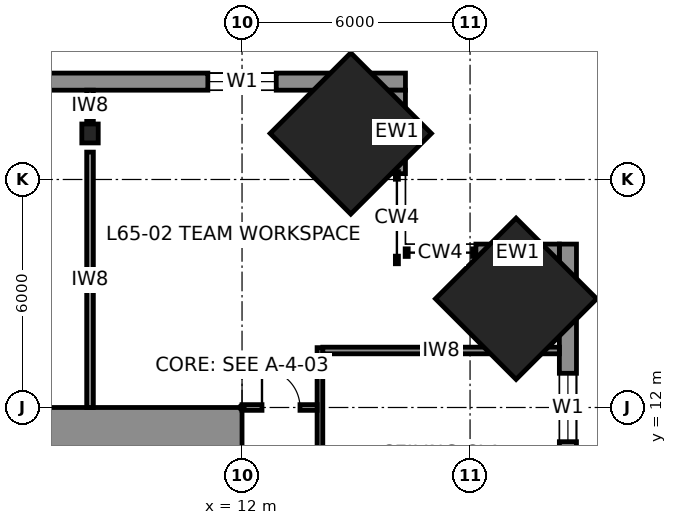
"""IFC4 building model, lengths in metres.
Left out: names, types, materials, properties, quantities, classifications, styles, units other than length and angle.
Written with IfcOpenShell. Run it as: python <this file> out.ifc"""

import sys

from ifc_helpers import new_model, si_unit, direction, frame, frame_2d, origin, origin_2d, place, context, subcontext, project, spatial, rectangle, i_section, extrude, element, fill, save


model = new_model("IFC4")
c1 = context("Model", 3, precision=1e-05, world=origin(), true_north=direction((0.0, 1.0)))
c2 = subcontext(c1, "Body", "Model", "MODEL_VIEW")
j1 = project(units=[si_unit("LENGTHUNIT", "METRE"), si_unit("PLANEANGLEUNIT", "RADIAN")], contexts=[c1])
p1 = place(None, origin())
s1 = spatial("IfcSite", under=j1, at=p1, CompositionType="ELEMENT")
p2 = place(p1, origin())
s2 = spatial("IfcBuilding", under=s1, at=p2, CompositionType="ELEMENT")
p3 = place(p2, frame((0.0, 0.0, 289.8)))
s3 = spatial("IfcBuildingStorey", under=s2, at=p3, CompositionType="ELEMENT", Elevation=289.8)
for number, where, z_axis, x_axis in (
    (1, (14.861, 19.211, 0.0), (-0.04, -0.04, 0.998), (0.707, -0.708, 0.0)),
    (2, (19.211, 14.861, 0.0), (-0.04, -0.04, 0.998), (0.708, -0.707, 0.0)),
):
    element("IfcColumn", number, at=place(p3, frame(where, z_axis=z_axis, x_axis=x_axis)), inside=s3, PredefinedType="COLUMN", context=c2, shape_type="SweptSolid", body=[
        extrude(rectangle(XDim=3.0, YDim=3.0, at=origin_2d()), origin(), (0.0, 0.0, 1.0), 4.007),
    ])
p4 = place(p3, frame((8.0, 19.211, 0.0), z_axis=(0.0, -0.040250558339, 0.999189617917), x_axis=(1.0, 0.0, 0.0)))
e3 = element("IfcColumn", 3, at=p4, inside=s3, PredefinedType="COLUMN", context=c2, shape_type="SweptSolid", body=[
    extrude(i_section(OverallWidth=0.432, OverallDepth=0.498, WebThickness=0.056, FlangeThickness=0.089, at=origin_2d()), origin(), (0.0, 0.0, 1.0), 4.003),
])
p5 = place(p3, frame((-12.0, 11.25, 0.0), z_axis=(0.0, 0.0, 1.0), x_axis=(1.0, 0.0, 0.0)))
e4 = element("IfcWall", 4, at=p5, inside=s3, PredefinedType="SHEAR", context=c2, shape_type="SweptSolid", body=[
    extrude(rectangle(XDim=24.0, YDim=1.5, at=frame_2d((12.0, 0.0))), origin(), (0.0, 0.0, 1.0), 4.0),
])
p6 = place(p3, frame((16.3, 20.575, 0.0), z_axis=(0.0, 0.0, 1.0), x_axis=(-1.0, 0.0, 0.0)))
e5 = element("IfcWall", 5, at=p6, inside=s3, PredefinedType="SOLIDWALL", context=c2, shape_type="SweptSolid", body=[
    extrude(rectangle(XDim=32.6, YDim=0.45, at=frame_2d((16.3, 0.0))), origin(), (0.0, 0.0, 1.0), 3.83),
])
p7 = place(p6, frame((3.4, 0.0, 0.7)))
e6 = element("IfcOpeningElement", 6, at=p7, cuts=e5, PredefinedType="OPENING", context=c2, shape_type="SweptSolid", body=[
    extrude(rectangle(XDim=1.8, YDim=2.6, at=frame_2d((0.9, 1.3))), frame((0.0, 0.235, 0.0), z_axis=(0.0, -1.0, 0.0), x_axis=(1.0, 0.0, 0.0)), (0.0, 0.0, 1.0), 0.47),
])
p8 = place(p6, frame((9.4, 0.0, 0.7)))
e7 = element("IfcOpeningElement", 7, at=p8, cuts=e5, PredefinedType="OPENING", context=c2, shape_type="SweptSolid", body=[
    extrude(rectangle(XDim=1.8, YDim=2.6, at=frame_2d((0.9, 1.3))), frame((0.0, 0.235, 0.0), z_axis=(0.0, -1.0, 0.0), x_axis=(1.0, 0.0, 0.0)), (0.0, 0.0, 1.0), 0.47),
])
p9 = place(p6, frame((12.4, 0.0, 0.7)))
e8 = element("IfcOpeningElement", 8, at=p9, cuts=e5, PredefinedType="OPENING", context=c2, shape_type="SweptSolid", body=[
    extrude(rectangle(XDim=1.8, YDim=2.6, at=frame_2d((0.9, 1.3))), frame((0.0, 0.235, 0.0), z_axis=(0.0, -1.0, 0.0), x_axis=(1.0, 0.0, 0.0)), (0.0, 0.0, 1.0), 0.47),
])
p10 = place(p6, frame((18.4, 0.0, 0.7)))
e9 = element("IfcOpeningElement", 9, at=p10, cuts=e5, PredefinedType="OPENING", context=c2, shape_type="SweptSolid", body=[
    extrude(rectangle(XDim=1.8, YDim=2.6, at=frame_2d((0.9, 1.3))), frame((0.0, 0.235, 0.0), z_axis=(0.0, -1.0, 0.0), x_axis=(1.0, 0.0, 0.0)), (0.0, 0.0, 1.0), 0.47),
])
p11 = place(p6, frame((21.4, 0.0, 0.7)))
e10 = element("IfcOpeningElement", 10, at=p11, cuts=e5, PredefinedType="OPENING", context=c2, shape_type="SweptSolid", body=[
    extrude(rectangle(XDim=1.8, YDim=2.6, at=frame_2d((0.9, 1.3))), frame((0.0, 0.235, 0.0), z_axis=(0.0, -1.0, 0.0), x_axis=(1.0, 0.0, 0.0)), (0.0, 0.0, 1.0), 0.47),
])
p12 = place(p6, frame((27.4, 0.0, 0.7)))
e11 = element("IfcOpeningElement", 11, at=p12, cuts=e5, PredefinedType="OPENING", context=c2, shape_type="SweptSolid", body=[
    extrude(rectangle(XDim=1.8, YDim=2.6, at=frame_2d((0.9, 1.3))), frame((0.0, 0.235, 0.0), z_axis=(0.0, -1.0, 0.0), x_axis=(1.0, 0.0, 0.0)), (0.0, 0.0, 1.0), 0.47),
])
p13 = place(p3, frame((20.575, -16.3, 0.0), z_axis=(0.0, 0.0, 1.0), x_axis=(0.0, 1.0, 0.0)))
e12 = element("IfcWall", 12, at=p13, inside=s3, PredefinedType="SOLIDWALL", context=c2, shape_type="SweptSolid", body=[
    extrude(rectangle(XDim=32.6, YDim=0.45, at=frame_2d((16.3, 0.0))), origin(), (0.0, 0.0, 1.0), 3.83),
])
p14 = place(p13, frame((3.4, 0.0, 0.7)))
e13 = element("IfcOpeningElement", 13, at=p14, cuts=e12, PredefinedType="OPENING", context=c2, shape_type="SweptSolid", body=[
    extrude(rectangle(XDim=1.8, YDim=2.6, at=frame_2d((0.9, 1.3))), frame((0.0, 0.235, 0.0), z_axis=(0.0, -1.0, 0.0), x_axis=(1.0, 0.0, 0.0)), (0.0, 0.0, 1.0), 0.47),
])
p15 = place(p13, frame((9.4, 0.0, 0.7)))
e14 = element("IfcOpeningElement", 14, at=p15, cuts=e12, PredefinedType="OPENING", context=c2, shape_type="SweptSolid", body=[
    extrude(rectangle(XDim=1.8, YDim=2.6, at=frame_2d((0.9, 1.3))), frame((0.0, 0.235, 0.0), z_axis=(0.0, -1.0, 0.0), x_axis=(1.0, 0.0, 0.0)), (0.0, 0.0, 1.0), 0.47),
])
p16 = place(p13, frame((12.4, 0.0, 0.7)))
e15 = element("IfcOpeningElement", 15, at=p16, cuts=e12, PredefinedType="OPENING", context=c2, shape_type="SweptSolid", body=[
    extrude(rectangle(XDim=1.8, YDim=2.6, at=frame_2d((0.9, 1.3))), frame((0.0, 0.235, 0.0), z_axis=(0.0, -1.0, 0.0), x_axis=(1.0, 0.0, 0.0)), (0.0, 0.0, 1.0), 0.47),
])
p17 = place(p13, frame((18.4, 0.0, 0.7)))
e16 = element("IfcOpeningElement", 16, at=p17, cuts=e12, PredefinedType="OPENING", context=c2, shape_type="SweptSolid", body=[
    extrude(rectangle(XDim=1.8, YDim=2.6, at=frame_2d((0.9, 1.3))), frame((0.0, 0.235, 0.0), z_axis=(0.0, -1.0, 0.0), x_axis=(1.0, 0.0, 0.0)), (0.0, 0.0, 1.0), 0.47),
])
p18 = place(p13, frame((21.4, 0.0, 0.7)))
e17 = element("IfcOpeningElement", 17, at=p18, cuts=e12, PredefinedType="OPENING", context=c2, shape_type="SweptSolid", body=[
    extrude(rectangle(XDim=1.8, YDim=2.6, at=frame_2d((0.9, 1.3))), frame((0.0, 0.235, 0.0), z_axis=(0.0, -1.0, 0.0), x_axis=(1.0, 0.0, 0.0)), (0.0, 0.0, 1.0), 0.47),
])
p19 = place(p13, frame((27.4, 0.0, 0.7)))
e18 = element("IfcOpeningElement", 18, at=p19, cuts=e12, PredefinedType="OPENING", context=c2, shape_type="SweptSolid", body=[
    extrude(rectangle(XDim=1.8, YDim=2.6, at=frame_2d((0.9, 1.3))), frame((0.0, 0.235, 0.0), z_axis=(0.0, -1.0, 0.0), x_axis=(1.0, 0.0, 0.0)), (0.0, 0.0, 1.0), 0.47),
])
for number, where, z_axis, x_axis in (
    (19, (16.075, 18.154, 0.0), (0.0, 0.0, 1.0), (0.0, 1.0, 0.0)),
    (20, (18.154, 16.075, 0.0), (0.0, 0.0, 1.0), (1.0, 0.0, 0.0)),
):
    element("IfcWall", number, at=place(p3, frame(where, z_axis=z_axis, x_axis=x_axis)), inside=s3, PredefinedType="SOLIDWALL", context=c2, shape_type="SweptSolid", body=[
        extrude(rectangle(XDim=2.197, YDim=0.45, at=frame_2d((1.098, 0.0))), origin(), (0.0, 0.0, 1.0), 3.83),
    ])
p20 = place(p3, frame((14.05, -13.575, 0.0), z_axis=(0.0, 0.0, 1.0), x_axis=(0.0, 1.0, 0.0)))
e21 = element("IfcWall", 21, at=p20, inside=s3, PredefinedType="PARTITIONING", context=c2, shape_type="SweptSolid", body=[
    extrude(rectangle(XDim=27.15, YDim=0.15, at=frame_2d((13.575, 0.0))), origin(), (0.0, 0.0, 1.0), 3.83),
])
p21 = place(p20, frame((4.525, 0.0, 0.0)))
e22 = element("IfcOpeningElement", 22, at=p21, cuts=e21, PredefinedType="OPENING", context=c2, shape_type="SweptSolid", body=[
    extrude(rectangle(XDim=1.4, YDim=2.3, at=frame_2d((0.7, 1.15))), frame((0.0, 0.085, 0.0), z_axis=(0.0, -1.0, 0.0), x_axis=(1.0, 0.0, 0.0)), (0.0, 0.0, 1.0), 0.17),
])
p22 = place(p20, frame((9.825, 0.0, 0.0)))
e23 = element("IfcOpeningElement", 23, at=p22, cuts=e21, PredefinedType="OPENING", context=c2, shape_type="SweptSolid", body=[
    extrude(rectangle(XDim=1.0, YDim=2.3, at=frame_2d((0.5, 1.15))), frame((0.0, 0.085, 0.0), z_axis=(0.0, -1.0, 0.0), x_axis=(1.0, 0.0, 0.0)), (0.0, 0.0, 1.0), 0.17),
])
p23 = place(p20, frame((16.575, 0.0, 0.0)))
e24 = element("IfcOpeningElement", 24, at=p23, cuts=e21, PredefinedType="OPENING", context=c2, shape_type="SweptSolid", body=[
    extrude(rectangle(XDim=1.0, YDim=2.3, at=frame_2d((0.5, 1.15))), frame((0.0, 0.085, 0.0), z_axis=(0.0, -1.0, 0.0), x_axis=(1.0, 0.0, 0.0)), (0.0, 0.0, 1.0), 0.17),
])
p24 = place(p3, frame((12.0, 12.0, 0.0), z_axis=(0.0, 0.0, 1.0), x_axis=(1.0, 0.0, 0.0)))
e25 = element("IfcWall", 25, at=p24, inside=s3, PredefinedType="PARTITIONING", context=c2, shape_type="SweptSolid", body=[
    extrude(rectangle(XDim=1.975, YDim=0.15, at=frame_2d((0.988, 0.0))), origin(), (0.0, 0.0, 1.0), 3.83),
])
p25 = place(p24, frame((0.525, 0.0, 0.0)))
e26 = element("IfcOpeningElement", 26, at=p25, cuts=e25, PredefinedType="OPENING", context=c2, shape_type="SweptSolid", body=[
    extrude(rectangle(XDim=1.0, YDim=2.3, at=frame_2d((0.5, 1.15))), frame((0.0, 0.085, 0.0), z_axis=(0.0, -1.0, 0.0), x_axis=(1.0, 0.0, 0.0)), (0.0, 0.0, 1.0), 0.17),
])
p26 = place(p3, frame((14.125, 13.5, 0.0), z_axis=(0.0, 0.0, 1.0), x_axis=(1.0, 0.0, 0.0)))
e27 = element("IfcWall", 27, at=p26, inside=s3, PredefinedType="PARTITIONING", context=c2, shape_type="SweptSolid", body=[
    extrude(rectangle(XDim=6.225, YDim=0.175, at=frame_2d((3.113, 0.0))), origin(), (0.0, 0.0, 1.0), 3.83),
])
p27 = place(p3, frame((8.0, 12.0, 0.0), z_axis=(0.0, 0.0, 1.0), x_axis=(0.0, 1.0, 0.0)))
e28 = element("IfcWall", 28, at=p27, inside=s3, PredefinedType="PARTITIONING", context=c2, shape_type="SweptSolid", body=[
    extrude(rectangle(XDim=6.72, YDim=0.175, at=frame_2d((3.36, 0.0))), origin(), (0.0, 0.0, 1.0), 3.016),
])
p28 = place(p3, frame((8.0, 19.541, 0.0), z_axis=(0.0, 0.0, 1.0), x_axis=(0.0, 1.0, 0.0)))
e29 = element("IfcWall", 29, at=p28, inside=s3, PredefinedType="PARTITIONING", context=c2, shape_type="SweptSolid", body=[
    extrude(rectangle(XDim=0.809, YDim=0.175, at=frame_2d((0.405, 0.0))), origin(), (0.0, 0.0, 1.0), 3.83),
])
p29 = place(p7, origin())
e30 = element("IfcWindow", 30, at=p29, inside=s3, PartitioningType="SINGLE_PANEL", PredefinedType="WINDOW", context=c2, shape_type="SweptSolid", body=[
    extrude(rectangle(XDim=1.8, YDim=2.6, at=frame_2d((0.9, 1.3))), frame((0.0, 0.03, 0.0), z_axis=(0.0, -1.0, 0.0), x_axis=(1.0, 0.0, 0.0)), (0.0, 0.0, 1.0), 0.06),
])
fill(e6, e30)
p30 = place(p19, origin())
e31 = element("IfcWindow", 31, at=p30, inside=s3, PartitioningType="SINGLE_PANEL", PredefinedType="WINDOW", context=c2, shape_type="SweptSolid", body=[
    extrude(rectangle(XDim=1.8, YDim=2.6, at=frame_2d((0.9, 1.3))), frame((0.0, 0.03, 0.0), z_axis=(0.0, -1.0, 0.0), x_axis=(1.0, 0.0, 0.0)), (0.0, 0.0, 1.0), 0.06),
])
fill(e18, e31)
p31 = place(p25, origin())
e32 = element("IfcDoor", 32, at=p31, inside=s3, OperationType="SINGLE_SWING_LEFT", PredefinedType="DOOR", context=c2, shape_type="SweptSolid", body=[
    extrude(rectangle(XDim=1.0, YDim=2.3, at=frame_2d((0.5, 1.15))), frame((0.0, 0.025, 0.0), z_axis=(0.0, -1.0, 0.0), x_axis=(1.0, 0.0, 0.0)), (0.0, 0.0, 1.0), 0.05),
])
fill(e26, e32)
save(model, sys.argv[1])
